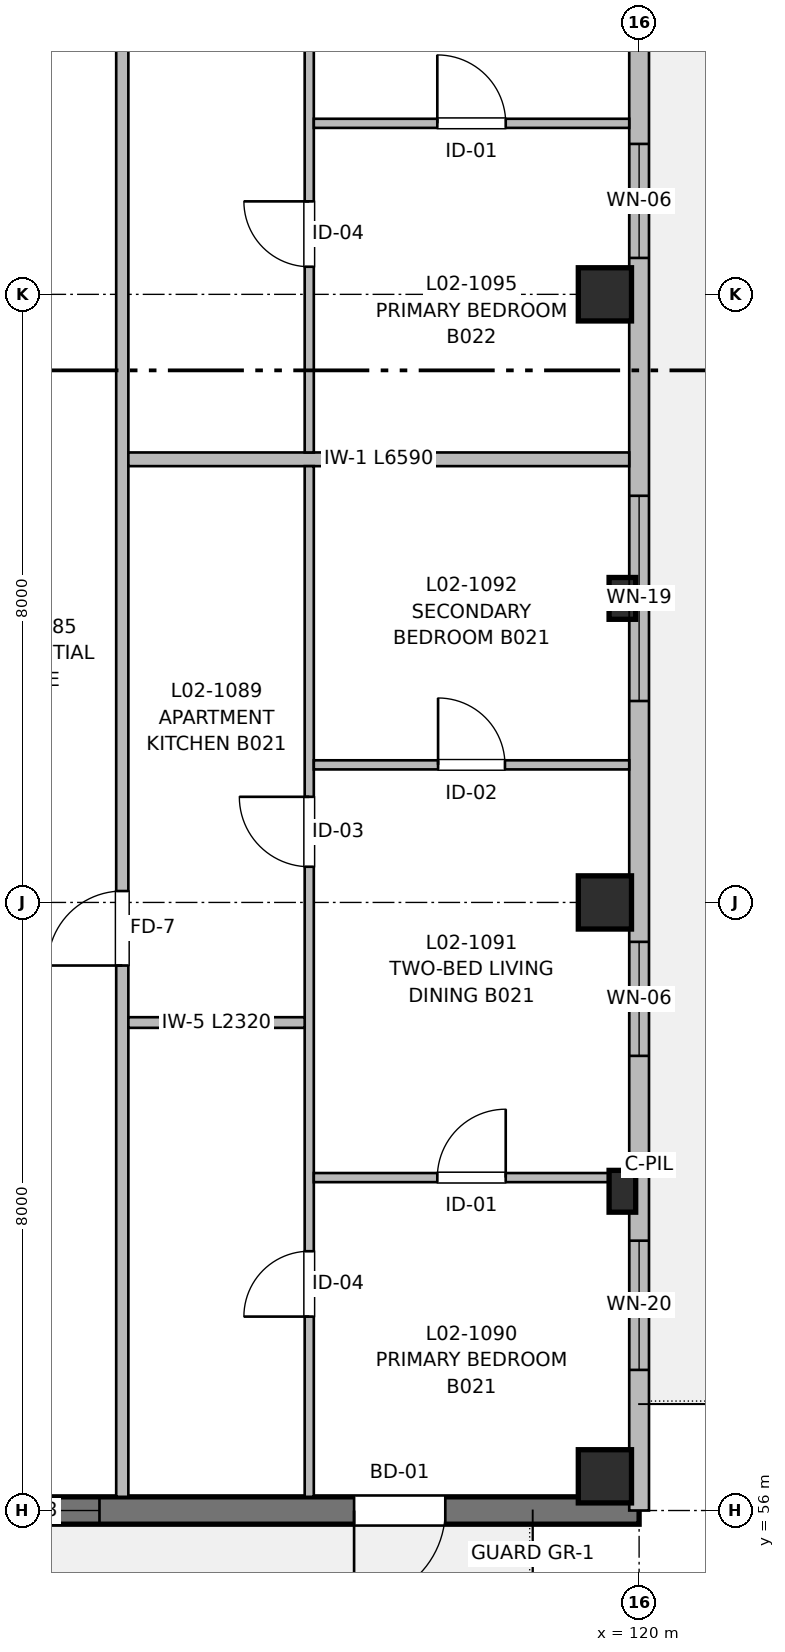
"""IFC4 building model, lengths in metres.
Left out: names, types, materials, properties, quantities, classifications, styles, units other than length and angle.
Written with IfcOpenShell. Run it as: python <this file> out.ifc"""

import sys

from ifc_helpers import new_model, si_unit, direction, frame, frame_2d, origin, origin_2d, place, context, subcontext, project, spatial, rectangle, extrude, element, fill, save


model = new_model("IFC4")
c1 = context("Model", 3, precision=1e-05, world=origin(), true_north=direction((0.0, 1.0)))
c2 = subcontext(c1, "Body", "Model", "MODEL_VIEW")
j1 = project(units=[si_unit("LENGTHUNIT", "METRE"), si_unit("PLANEANGLEUNIT", "RADIAN")], contexts=[c1])
p1 = place(None, origin())
s1 = spatial("IfcSite", under=j1, at=p1, CompositionType="ELEMENT")
p2 = place(p1, origin())
s2 = spatial("IfcBuilding", under=s1, at=p2, CompositionType="ELEMENT")
p3 = place(p2, frame((0.0, 0.0, 7.36)))
s3 = spatial("IfcBuildingStorey", under=s2, at=p3, CompositionType="ELEMENT", Elevation=7.36)
for number, where, z_axis, x_axis in (
    (1, (119.55, 56.45, 0.0), (0.0, 0.0, 1.0), (1.0, 0.0, 0.0)),
    (2, (119.55, 64.0, 0.0), (0.0, 0.0, 1.0), (1.0, 0.0, 0.0)),
    (3, (119.55, 72.0, 0.0), (0.0, 0.0, 1.0), (1.0, 0.0, 0.0)),
):
    element("IfcColumn", number, at=place(p3, frame(where, z_axis=z_axis, x_axis=x_axis)), inside=s3, PredefinedType="COLUMN", context=c2, shape_type="SweptSolid", body=[
        extrude(rectangle(XDim=0.7, YDim=0.7, at=origin_2d()), origin(), (0.0, 0.0, 1.0), 3.2),
    ])
for number, where, z_axis, x_axis in (
    (4, (119.78, 60.2, 0.0), (0.0, 0.0, 1.0), (1.0, 0.0, 0.0)),
    (5, (119.78, 68.0, 0.0), (0.0, 0.0, 1.0), (1.0, 0.0, 0.0)),
):
    element("IfcColumn", number, at=place(p3, frame(where, z_axis=z_axis, x_axis=x_axis)), inside=s3, PredefinedType="PILASTER", context=c2, shape_type="SweptSolid", body=[
        extrude(rectangle(XDim=0.35, YDim=0.55, at=origin_2d()), origin(), (0.0, 0.0, 1.0), 3.2),
    ])
p4 = place(p3, frame((120.0, 56.0, 0.0), z_axis=(0.0, 0.0, 1.0), x_axis=(-1.0, 0.0, 0.0)))
e6 = element("IfcWall", 6, at=p4, inside=s3, PredefinedType="SHEAR", context=c2, shape_type="SweptSolid", body=[
    extrude(rectangle(XDim=16.0, YDim=0.36, at=frame_2d((8.0, 0.0))), origin(), (0.0, 0.0, 1.0), 2.98),
])
p5 = place(p4, frame((2.55, 0.0, 0.0)))
e7 = element("IfcOpeningElement", 7, at=p5, cuts=e6, PredefinedType="OPENING", context=c2, shape_type="SweptSolid", body=[
    extrude(rectangle(XDim=1.2, YDim=2.2, at=frame_2d((0.6, 1.1))), frame((0.0, 0.19, 0.0), z_axis=(0.0, -1.0, 0.0), x_axis=(1.0, 0.0, 0.0)), (0.0, 0.0, 1.0), 0.38),
])
p6 = place(p4, frame((7.1, 0.0, 0.72)))
e8 = element("IfcOpeningElement", 8, at=p6, cuts=e6, PredefinedType="OPENING", context=c2, shape_type="SweptSolid", body=[
    extrude(rectangle(XDim=1.95, YDim=1.5, at=frame_2d((0.975, 0.75))), frame((0.0, 0.19, 0.0), z_axis=(0.0, -1.0, 0.0), x_axis=(1.0, 0.0, 0.0)), (0.0, 0.0, 1.0), 0.38),
])
p7 = place(p4, frame((11.45, 0.0, 0.62)))
e9 = element("IfcOpeningElement", 9, at=p7, cuts=e6, PredefinedType="OPENING", context=c2, shape_type="SweptSolid", body=[
    extrude(rectangle(XDim=1.1, YDim=1.6, at=frame_2d((0.55, 0.8))), frame((0.0, 0.19, 0.0), z_axis=(0.0, -1.0, 0.0), x_axis=(1.0, 0.0, 0.0)), (0.0, 0.0, 1.0), 0.38),
])
p8 = place(p3, frame((120.0, 88.0, 0.0), z_axis=(0.0, 0.0, 1.0), x_axis=(0.0, -1.0, 0.0)))
e10 = element("IfcWall", 10, at=p8, inside=s3, PredefinedType="SOLIDWALL", context=c2, shape_type="SweptSolid", body=[
    extrude(rectangle(XDim=32.0, YDim=0.26, at=frame_2d((16.0, 0.0))), origin(), (0.0, 0.0, 1.0), 2.98),
])
p9 = place(p8, frame((5.0, 0.0, 0.0)))
e11 = element("IfcOpeningElement", 11, at=p9, cuts=e10, PredefinedType="OPENING", context=c2, shape_type="SweptSolid", body=[
    extrude(rectangle(XDim=1.2, YDim=2.2, at=frame_2d((0.6, 1.1))), frame((0.0, 0.14, 0.0), z_axis=(0.0, -1.0, 0.0), x_axis=(1.0, 0.0, 0.0)), (0.0, 0.0, 1.0), 0.28),
])
p10 = place(p8, frame((11.45, 0.0, 0.62)))
e12 = element("IfcOpeningElement", 12, at=p10, cuts=e10, PredefinedType="OPENING", context=c2, shape_type="SweptSolid", body=[
    extrude(rectangle(XDim=1.1, YDim=1.6, at=frame_2d((0.55, 0.8))), frame((0.0, 0.14, 0.0), z_axis=(0.0, -1.0, 0.0), x_axis=(1.0, 0.0, 0.0)), (0.0, 0.0, 1.0), 0.28),
])
p11 = place(p8, frame((18.65, 0.0, 0.47)))
e13 = element("IfcOpeningElement", 13, at=p11, cuts=e10, PredefinedType="OPENING", context=c2, shape_type="SweptSolid", body=[
    extrude(rectangle(XDim=2.7, YDim=1.75, at=frame_2d((1.35, 0.875))), frame((0.0, 0.14, 0.0), z_axis=(0.0, -1.0, 0.0), x_axis=(1.0, 0.0, 0.0)), (0.0, 0.0, 1.0), 0.28),
])
p12 = place(p8, frame((28.45, 0.0, 0.72)))
e14 = element("IfcOpeningElement", 14, at=p12, cuts=e10, PredefinedType="OPENING", context=c2, shape_type="SweptSolid", body=[
    extrude(rectangle(XDim=1.7, YDim=1.5, at=frame_2d((0.85, 0.75))), frame((0.0, 0.14, 0.0), z_axis=(0.0, -1.0, 0.0), x_axis=(1.0, 0.0, 0.0)), (0.0, 0.0, 1.0), 0.28),
])
p13 = place(p8, frame((24.519, 0.0, 0.82)))
e15 = element("IfcOpeningElement", 15, at=p13, cuts=e10, PredefinedType="OPENING", context=c2, shape_type="SweptSolid", body=[
    extrude(rectangle(XDim=1.5, YDim=1.4, at=frame_2d((0.75, 0.7))), frame((0.0, 0.14, 0.0), z_axis=(0.0, -1.0, 0.0), x_axis=(1.0, 0.0, 0.0)), (0.0, 0.0, 1.0), 0.28),
])
p14 = place(p8, frame((14.021, 0.0, 0.82)))
e16 = element("IfcOpeningElement", 16, at=p14, cuts=e10, PredefinedType="OPENING", context=c2, shape_type="SweptSolid", body=[
    extrude(rectangle(XDim=1.5, YDim=1.4, at=frame_2d((0.75, 0.7))), frame((0.0, 0.14, 0.0), z_axis=(0.0, -1.0, 0.0), x_axis=(1.0, 0.0, 0.0)), (0.0, 0.0, 1.0), 0.28),
])
p15 = place(p8, frame((1.305, 0.0, 0.82)))
e17 = element("IfcOpeningElement", 17, at=p15, cuts=e10, PredefinedType="OPENING", context=c2, shape_type="SweptSolid", body=[
    extrude(rectangle(XDim=1.5, YDim=1.4, at=frame_2d((0.75, 0.7))), frame((0.0, 0.14, 0.0), z_axis=(0.0, -1.0, 0.0), x_axis=(1.0, 0.0, 0.0)), (0.0, 0.0, 1.0), 0.28),
])
p16 = place(p3, frame((113.2, 56.18, 0.0), z_axis=(0.0, 0.0, 1.0), x_axis=(0.0, 1.0, 0.0)))
e18 = element("IfcWall", 18, at=p16, inside=s3, PredefinedType="PARTITIONING", context=c2, shape_type="SweptSolid", body=[
    extrude(rectangle(XDim=50.62, YDim=0.16, at=frame_2d((25.31, 0.0))), origin(), (0.0, 0.0, 1.0), 2.935),
])
p17 = place(p16, frame((6.99, 0.0, 0.0)))
e19 = element("IfcOpeningElement", 19, at=p17, cuts=e18, PredefinedType="OPENING", context=c2, shape_type="SweptSolid", body=[
    extrude(rectangle(XDim=0.98, YDim=2.15, at=frame_2d((0.49, 1.075))), frame((0.0, 0.09, 0.0), z_axis=(0.0, -1.0, 0.0), x_axis=(1.0, 0.0, 0.0)), (0.0, 0.0, 1.0), 0.18),
])
p18 = place(p16, frame((20.92, 0.0, 0.0)))
e20 = element("IfcOpeningElement", 20, at=p18, cuts=e18, PredefinedType="OPENING", context=c2, shape_type="SweptSolid", body=[
    extrude(rectangle(XDim=0.98, YDim=2.15, at=frame_2d((0.49, 1.075))), frame((0.0, 0.09, 0.0), z_axis=(0.0, -1.0, 0.0), x_axis=(1.0, 0.0, 0.0)), (0.0, 0.0, 1.0), 0.18),
])
p19 = place(p16, frame((33.67, 0.0, 0.0)))
e21 = element("IfcOpeningElement", 21, at=p19, cuts=e18, PredefinedType="OPENING", context=c2, shape_type="SweptSolid", body=[
    extrude(rectangle(XDim=0.98, YDim=2.15, at=frame_2d((0.49, 1.075))), frame((0.0, 0.09, 0.0), z_axis=(0.0, -1.0, 0.0), x_axis=(1.0, 0.0, 0.0)), (0.0, 0.0, 1.0), 0.18),
])
p20 = place(p16, frame((45.06, 0.0, 0.0)))
e22 = element("IfcOpeningElement", 22, at=p20, cuts=e18, PredefinedType="OPENING", context=c2, shape_type="SweptSolid", body=[
    extrude(rectangle(XDim=0.98, YDim=2.15, at=frame_2d((0.49, 1.075))), frame((0.0, 0.09, 0.0), z_axis=(0.0, -1.0, 0.0), x_axis=(1.0, 0.0, 0.0)), (0.0, 0.0, 1.0), 0.18),
])
p21 = place(p3, frame((113.28, 69.83, 0.0), z_axis=(0.0, 0.0, 1.0), x_axis=(1.0, 0.0, 0.0)))
e23 = element("IfcWall", 23, at=p21, inside=s3, PredefinedType="PARTITIONING", context=c2, shape_type="SweptSolid", body=[
    extrude(rectangle(XDim=6.59, YDim=0.18, at=frame_2d((3.295, 0.0))), origin(), (0.0, 0.0, 1.0), 2.935),
])
p22 = place(p3, frame((115.66, 56.18, 0.0), z_axis=(0.0, 0.0, 1.0), x_axis=(0.0, 1.0, 0.0)))
e24 = element("IfcWall", 24, at=p22, inside=s3, PredefinedType="PARTITIONING", context=c2, shape_type="SweptSolid", body=[
    extrude(rectangle(XDim=13.56, YDim=0.12, at=frame_2d((6.78, 0.0))), origin(), (0.0, 0.0, 1.0), 2.935),
])
p23 = place(p22, frame((2.371, 0.0, 0.0)))
e25 = element("IfcOpeningElement", 25, at=p23, cuts=e24, PredefinedType="OPENING", context=c2, shape_type="SweptSolid", body=[
    extrude(rectangle(XDim=0.86, YDim=2.1, at=frame_2d((0.43, 1.05))), frame((0.0, 0.07, 0.0), z_axis=(0.0, -1.0, 0.0), x_axis=(1.0, 0.0, 0.0)), (0.0, 0.0, 1.0), 0.14),
])
p24 = place(p22, frame((8.29, 0.0, 0.0)))
e26 = element("IfcOpeningElement", 26, at=p24, cuts=e24, PredefinedType="OPENING", context=c2, shape_type="SweptSolid", body=[
    extrude(rectangle(XDim=0.92, YDim=2.1, at=frame_2d((0.46, 1.05))), frame((0.0, 0.07, 0.0), z_axis=(0.0, -1.0, 0.0), x_axis=(1.0, 0.0, 0.0)), (0.0, 0.0, 1.0), 0.14),
])
p25 = place(p3, frame((113.28, 62.42, 0.0), z_axis=(0.0, 0.0, 1.0), x_axis=(1.0, 0.0, 0.0)))
e27 = element("IfcWall", 27, at=p25, inside=s3, PredefinedType="PARTITIONING", context=c2, shape_type="SweptSolid", body=[
    extrude(rectangle(XDim=2.32, YDim=0.14, at=frame_2d((1.16, 0.0))), origin(), (0.0, 0.0, 1.0), 2.935),
])
p26 = place(p3, frame((115.72, 60.38, 0.0), z_axis=(0.0, 0.0, 1.0), x_axis=(1.0, 0.0, 0.0)))
e28 = element("IfcWall", 28, at=p26, inside=s3, PredefinedType="PARTITIONING", context=c2, shape_type="SweptSolid", body=[
    extrude(rectangle(XDim=4.15, YDim=0.12, at=frame_2d((2.075, 0.0))), origin(), (0.0, 0.0, 1.0), 2.935),
])
p27 = place(p26, frame((1.625, 0.0, 0.0)))
e29 = element("IfcOpeningElement", 29, at=p27, cuts=e28, PredefinedType="OPENING", context=c2, shape_type="SweptSolid", body=[
    extrude(rectangle(XDim=0.9, YDim=2.1, at=frame_2d((0.45, 1.05))), frame((0.0, 0.07, 0.0), z_axis=(0.0, -1.0, 0.0), x_axis=(1.0, 0.0, 0.0)), (0.0, 0.0, 1.0), 0.14),
])
p28 = place(p3, frame((115.72, 65.81, 0.0), z_axis=(0.0, 0.0, 1.0), x_axis=(1.0, 0.0, 0.0)))
e30 = element("IfcWall", 30, at=p28, inside=s3, PredefinedType="PARTITIONING", context=c2, shape_type="SweptSolid", body=[
    extrude(rectangle(XDim=4.15, YDim=0.12, at=frame_2d((2.075, 0.0))), origin(), (0.0, 0.0, 1.0), 2.935),
])
p29 = place(p28, frame((1.635, 0.0, 0.0)))
e31 = element("IfcOpeningElement", 31, at=p29, cuts=e30, PredefinedType="OPENING", context=c2, shape_type="SweptSolid", body=[
    extrude(rectangle(XDim=0.88, YDim=2.1, at=frame_2d((0.44, 1.05))), frame((0.0, 0.07, 0.0), z_axis=(0.0, -1.0, 0.0), x_axis=(1.0, 0.0, 0.0)), (0.0, 0.0, 1.0), 0.14),
])
p30 = place(p3, frame((115.66, 69.92, 0.0), z_axis=(0.0, 0.0, 1.0), x_axis=(0.0, 1.0, 0.0)))
e32 = element("IfcWall", 32, at=p30, inside=s3, PredefinedType="PARTITIONING", context=c2, shape_type="SweptSolid", body=[
    extrude(rectangle(XDim=13.97, YDim=0.12, at=frame_2d((6.985, 0.0))), origin(), (0.0, 0.0, 1.0), 2.935),
])
p31 = place(p30, frame((2.443, 0.0, 0.0)))
e33 = element("IfcOpeningElement", 33, at=p31, cuts=e32, PredefinedType="OPENING", context=c2, shape_type="SweptSolid", body=[
    extrude(rectangle(XDim=0.86, YDim=2.1, at=frame_2d((0.43, 1.05))), frame((0.0, 0.07, 0.0), z_axis=(0.0, -1.0, 0.0), x_axis=(1.0, 0.0, 0.0)), (0.0, 0.0, 1.0), 0.14),
])
p32 = place(p30, frame((8.541, 0.0, 0.0)))
e34 = element("IfcOpeningElement", 34, at=p32, cuts=e32, PredefinedType="OPENING", context=c2, shape_type="SweptSolid", body=[
    extrude(rectangle(XDim=0.92, YDim=2.1, at=frame_2d((0.46, 1.05))), frame((0.0, 0.07, 0.0), z_axis=(0.0, -1.0, 0.0), x_axis=(1.0, 0.0, 0.0)), (0.0, 0.0, 1.0), 0.14),
])
p33 = place(p3, frame((115.72, 74.25, 0.0), z_axis=(0.0, 0.0, 1.0), x_axis=(1.0, 0.0, 0.0)))
e35 = element("IfcWall", 35, at=p33, inside=s3, PredefinedType="PARTITIONING", context=c2, shape_type="SweptSolid", body=[
    extrude(rectangle(XDim=4.15, YDim=0.12, at=frame_2d((2.075, 0.0))), origin(), (0.0, 0.0, 1.0), 2.935),
])
p34 = place(p33, frame((1.625, 0.0, 0.0)))
e36 = element("IfcOpeningElement", 36, at=p34, cuts=e35, PredefinedType="OPENING", context=c2, shape_type="SweptSolid", body=[
    extrude(rectangle(XDim=0.9, YDim=2.1, at=frame_2d((0.45, 1.05))), frame((0.0, 0.07, 0.0), z_axis=(0.0, -1.0, 0.0), x_axis=(1.0, 0.0, 0.0)), (0.0, 0.0, 1.0), 0.14),
])
p35 = place(p5, origin())
e37 = element("IfcDoor", 37, at=p35, inside=s3, OperationType="SINGLE_SWING_RIGHT", PredefinedType="DOOR", context=c2, shape_type="SweptSolid", body=[
    extrude(rectangle(XDim=1.2, YDim=2.2, at=frame_2d((0.6, 1.1))), frame((0.0, 0.025, 0.0), z_axis=(0.0, -1.0, 0.0), x_axis=(1.0, 0.0, 0.0)), (0.0, 0.0, 1.0), 0.05),
])
fill(e7, e37)
p36 = place(p6, origin())
e38 = element("IfcWindow", 38, at=p36, inside=s3, PartitioningType="SINGLE_PANEL", PredefinedType="WINDOW", context=c2, shape_type="SweptSolid", body=[
    extrude(rectangle(XDim=1.95, YDim=1.5, at=frame_2d((0.975, 0.75))), frame((0.0, 0.03, 0.0), z_axis=(0.0, -1.0, 0.0), x_axis=(1.0, 0.0, 0.0)), (0.0, 0.0, 1.0), 0.06),
])
fill(e8, e38)
p37 = place(p11, origin())
e39 = element("IfcWindow", 39, at=p37, inside=s3, PartitioningType="SINGLE_PANEL", PredefinedType="WINDOW", context=c2, shape_type="SweptSolid", body=[
    extrude(rectangle(XDim=2.7, YDim=1.75, at=frame_2d((1.35, 0.875))), frame((0.0, 0.03, 0.0), z_axis=(0.0, -1.0, 0.0), x_axis=(1.0, 0.0, 0.0)), (0.0, 0.0, 1.0), 0.06),
])
fill(e13, e39)
p38 = place(p12, origin())
e40 = element("IfcWindow", 40, at=p38, inside=s3, PartitioningType="SINGLE_PANEL", PredefinedType="WINDOW", context=c2, shape_type="SweptSolid", body=[
    extrude(rectangle(XDim=1.7, YDim=1.5, at=frame_2d((0.85, 0.75))), frame((0.0, 0.03, 0.0), z_axis=(0.0, -1.0, 0.0), x_axis=(1.0, 0.0, 0.0)), (0.0, 0.0, 1.0), 0.06),
])
fill(e14, e40)
p39 = place(p23, origin())
e41 = element("IfcDoor", 41, at=p39, inside=s3, OperationType="SINGLE_SWING_LEFT", PredefinedType="DOOR", context=c2, shape_type="SweptSolid", body=[
    extrude(rectangle(XDim=0.86, YDim=2.1, at=frame_2d((0.43, 1.05))), frame((0.0, 0.025, 0.0), z_axis=(0.0, -1.0, 0.0), x_axis=(1.0, 0.0, 0.0)), (0.0, 0.0, 1.0), 0.05),
])
fill(e25, e41)
p40 = place(p24, origin())
e42 = element("IfcDoor", 42, at=p40, inside=s3, OperationType="SINGLE_SWING_RIGHT", PredefinedType="DOOR", context=c2, shape_type="SweptSolid", body=[
    extrude(rectangle(XDim=0.92, YDim=2.1, at=frame_2d((0.46, 1.05))), frame((0.0, 0.025, 0.0), z_axis=(0.0, -1.0, 0.0), x_axis=(1.0, 0.0, 0.0)), (0.0, 0.0, 1.0), 0.05),
])
fill(e26, e42)
p41 = place(p17, origin())
e43 = element("IfcDoor", 43, at=p41, inside=s3, OperationType="SINGLE_SWING_LEFT", PredefinedType="DOOR", context=c2, shape_type="SweptSolid", body=[
    extrude(rectangle(XDim=0.98, YDim=2.15, at=frame_2d((0.49, 1.075))), frame((0.0, 0.025, 0.0), z_axis=(0.0, -1.0, 0.0), x_axis=(1.0, 0.0, 0.0)), (0.0, 0.0, 1.0), 0.05),
])
fill(e19, e43)
p42 = place(p27, origin())
e44 = element("IfcDoor", 44, at=p42, inside=s3, OperationType="SINGLE_SWING_RIGHT", PredefinedType="DOOR", context=c2, shape_type="SweptSolid", body=[
    extrude(rectangle(XDim=0.9, YDim=2.1, at=frame_2d((0.45, 1.05))), frame((0.0, 0.025, 0.0), z_axis=(0.0, -1.0, 0.0), x_axis=(1.0, 0.0, 0.0)), (0.0, 0.0, 1.0), 0.05),
])
fill(e29, e44)
p43 = place(p29, origin())
e45 = element("IfcDoor", 45, at=p43, inside=s3, OperationType="SINGLE_SWING_LEFT", PredefinedType="DOOR", context=c2, shape_type="SweptSolid", body=[
    extrude(rectangle(XDim=0.88, YDim=2.1, at=frame_2d((0.44, 1.05))), frame((0.0, 0.025, 0.0), z_axis=(0.0, -1.0, 0.0), x_axis=(1.0, 0.0, 0.0)), (0.0, 0.0, 1.0), 0.05),
])
fill(e31, e45)
p44 = place(p31, origin())
e46 = element("IfcDoor", 46, at=p44, inside=s3, OperationType="SINGLE_SWING_RIGHT", PredefinedType="DOOR", context=c2, shape_type="SweptSolid", body=[
    extrude(rectangle(XDim=0.86, YDim=2.1, at=frame_2d((0.43, 1.05))), frame((0.0, 0.025, 0.0), z_axis=(0.0, -1.0, 0.0), x_axis=(1.0, 0.0, 0.0)), (0.0, 0.0, 1.0), 0.05),
])
fill(e33, e46)
p45 = place(p34, origin())
e47 = element("IfcDoor", 47, at=p45, inside=s3, OperationType="SINGLE_SWING_LEFT", PredefinedType="DOOR", context=c2, shape_type="SweptSolid", body=[
    extrude(rectangle(XDim=0.9, YDim=2.1, at=frame_2d((0.45, 1.05))), frame((0.0, 0.025, 0.0), z_axis=(0.0, -1.0, 0.0), x_axis=(1.0, 0.0, 0.0)), (0.0, 0.0, 1.0), 0.05),
])
fill(e36, e47)
p46 = place(p13, origin())
e48 = element("IfcWindow", 48, at=p46, inside=s3, PartitioningType="SINGLE_PANEL", PredefinedType="WINDOW", context=c2, shape_type="SweptSolid", body=[
    extrude(rectangle(XDim=1.5, YDim=1.4, at=frame_2d((0.75, 0.7))), frame((0.0, 0.03, 0.0), z_axis=(0.0, -1.0, 0.0), x_axis=(1.0, 0.0, 0.0)), (0.0, 0.0, 1.0), 0.06),
])
fill(e15, e48)
p47 = place(p14, origin())
e49 = element("IfcWindow", 49, at=p47, inside=s3, PartitioningType="SINGLE_PANEL", PredefinedType="WINDOW", context=c2, shape_type="SweptSolid", body=[
    extrude(rectangle(XDim=1.5, YDim=1.4, at=frame_2d((0.75, 0.7))), frame((0.0, 0.03, 0.0), z_axis=(0.0, -1.0, 0.0), x_axis=(1.0, 0.0, 0.0)), (0.0, 0.0, 1.0), 0.06),
])
fill(e16, e49)
save(model, sys.argv[1])
